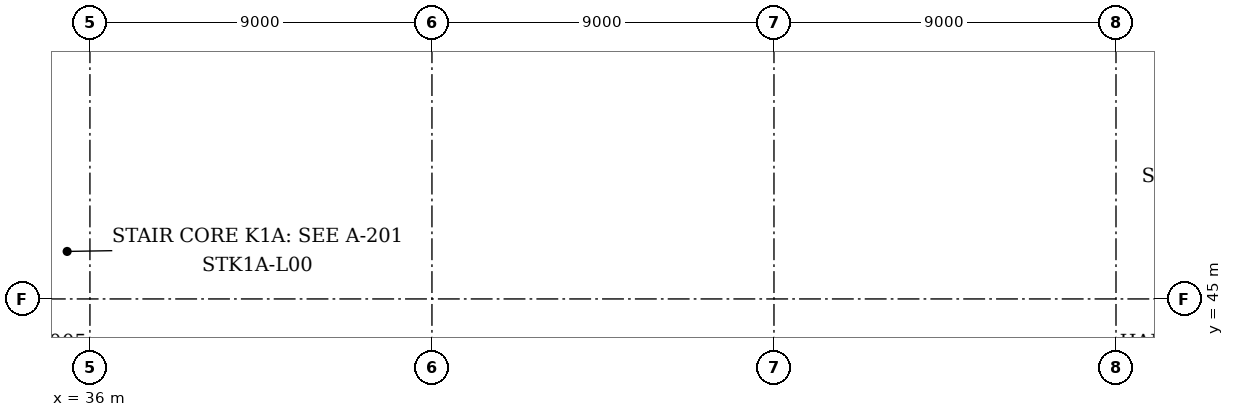
"""IFC4 building model, lengths in metres.
Left out: names, types, materials, properties, quantities, classifications, styles, units other than length and angle.
Written with IfcOpenShell. Run it as: python <this file> out.ifc"""

import sys

from ifc_helpers import new_model, si_unit, direction, frame, frame_2d, origin, origin_2d, place, context, subcontext, project, spatial, rectangle, hollow_rectangle, i_section, extrude, element, fill, save


model = new_model("IFC4")
c1 = context("Model", 3, precision=1e-05, world=origin(), true_north=direction((0.0, 1.0)))
c2 = subcontext(c1, "Body", "Model", "MODEL_VIEW")
j1 = project(units=[si_unit("LENGTHUNIT", "METRE"), si_unit("PLANEANGLEUNIT", "RADIAN")], contexts=[c1])
p1 = place(None, origin())
s1 = spatial("IfcSite", under=j1, at=p1, CompositionType="ELEMENT")
p2 = place(p1, origin())
s2 = spatial("IfcBuilding", under=s1, at=p2, CompositionType="ELEMENT")
p3 = place(p2, origin())
s3 = spatial("IfcBuildingStorey", under=s2, at=p3, CompositionType="ELEMENT", Elevation=0.0)
p4 = place(p3, frame((45.0, 45.0, 0.0), z_axis=(0.0, 0.0, 1.0), x_axis=(1.0, 0.0, 0.0)))
e1 = element("IfcColumn", 1, at=p4, inside=s3, PredefinedType="COLUMN", context=c2, shape_type="SweptSolid", body=[
    extrude(hollow_rectangle(XDim=0.3, YDim=0.3, WallThickness=0.016, InnerFilletRadius=0.024, OuterFilletRadius=0.04, at=origin_2d()), origin(), (0.0, 0.0, 1.0), 5.0),
])
p5 = place(p3, frame((54.0, 45.0, 0.0), z_axis=(0.0, 0.0, 1.0), x_axis=(1.0, 0.0, 0.0)))
e2 = element("IfcColumn", 2, at=p5, inside=s3, PredefinedType="COLUMN", context=c2, shape_type="SweptSolid", body=[
    extrude(i_section(OverallWidth=0.5, OverallDepth=0.48, WebThickness=0.04, FlangeThickness=0.04, at=origin_2d()), origin(), (0.0, 0.0, 1.0), 5.0),
])
p6 = place(p3, frame((54.25, 44.91, 0.0), z_axis=(0.0, 0.0, 1.0), x_axis=(1.0, 0.0, 0.0)))
e3 = element("IfcWall", 3, at=p6, inside=s3, PredefinedType="SOLIDWALL", context=c2, shape_type="SweptSolid", body=[
    extrude(rectangle(XDim=8.75, YDim=0.3, at=frame_2d((4.375, 0.0))), origin(), (0.0, 0.0, 1.0), 4.378),
])
p7 = place(p3, frame((36.0, 44.91, 0.0), z_axis=(0.0, 0.0, 1.0), x_axis=(1.0, 0.0, 0.0)))
e4 = element("IfcWall", 4, at=p7, inside=s3, PredefinedType="SOLIDWALL", context=c2, shape_type="SweptSolid", body=[
    extrude(rectangle(XDim=8.85, YDim=0.3, at=frame_2d((4.425, 0.0))), origin(), (0.0, 0.0, 1.0), 4.378),
])
p8 = place(p3, frame((47.95, 44.85, 0.0), z_axis=(0.0, 0.0, 1.0), x_axis=(1.0, 0.0, 0.0)))
e5 = element("IfcWall", 5, at=p8, inside=s3, PredefinedType="SOLIDWALL", context=c2, shape_type="SweptSolid", body=[
    extrude(rectangle(XDim=3.0, YDim=0.2, at=frame_2d((1.5, 0.0))), origin(), (0.0, 0.0, 1.0), 4.835),
])
p9 = place(p8, frame((0.3, 0.0, 0.0)))
e6 = element("IfcOpeningElement", 6, at=p9, cuts=e5, PredefinedType="OPENING", context=c2, shape_type="SweptSolid", body=[
    extrude(rectangle(XDim=2.4, YDim=2.4, at=frame_2d((1.2, 1.2))), frame((0.0, 0.11, 0.0), z_axis=(0.0, -1.0, 0.0), x_axis=(1.0, 0.0, 0.0)), (0.0, 0.0, 1.0), 0.22),
])
for number, where, z_axis, x_axis in (
    (7, (35.875, 45.2, -0.7), (0.0, 0.0, 1.0), (0.0, 1.0, 0.0)),
    (8, (63.125, 45.2, -0.7), (0.0, 0.0, 1.0), (0.0, 1.0, 0.0)),
):
    element("IfcWall", number, at=place(p3, frame(where, z_axis=z_axis, x_axis=x_axis)), inside=s3, PredefinedType="SOLIDWALL", context=c2, shape_type="SweptSolid", body=[
        extrude(rectangle(XDim=5.55, YDim=0.25, at=frame_2d((2.775, 0.0))), origin(), (0.0, 0.0, 1.0), 0.7),
    ])
for number, where, z_axis, x_axis in (
    (9, (35.75, 50.625, -0.7), (0.0, 0.0, 1.0), (1.0, 0.0, 0.0)),
    (10, (50.7, 50.625, -0.7), (0.0, 0.0, 1.0), (1.0, 0.0, 0.0)),
):
    element("IfcWall", number, at=place(p3, frame(where, z_axis=z_axis, x_axis=x_axis)), inside=s3, PredefinedType="SOLIDWALL", context=c2, shape_type="SweptSolid", body=[
        extrude(rectangle(XDim=12.55, YDim=0.25, at=frame_2d((6.275, 0.0))), origin(), (0.0, 0.0, 1.0), 0.7),
    ])
p10 = place(p3, frame((35.85, 40.8, 0.0), z_axis=(0.0, 0.0, 1.0), x_axis=(0.0, 1.0, 0.0)))
e11 = element("IfcWall", 11, at=p10, inside=s3, PredefinedType="SOLIDWALL", context=c2, shape_type="SweptSolid", body=[
    extrude(rectangle(XDim=3.9, YDim=0.3, at=frame_2d((1.95, 0.0))), origin(), (0.0, 0.0, 1.0), 5.0),
])
p11 = place(p10, frame((1.05, 0.0, 0.0)))
e12 = element("IfcOpeningElement", 12, at=p11, cuts=e11, PredefinedType="OPENING", context=c2, shape_type="SweptSolid", body=[
    extrude(rectangle(XDim=1.8, YDim=2.1, at=frame_2d((0.9, 1.05))), frame((0.0, 0.16, 0.0), z_axis=(0.0, -1.0, 0.0), x_axis=(1.0, 0.0, 0.0)), (0.0, 0.0, 1.0), 0.32),
])
p12 = place(p3, frame((27.0, 44.85, 0.0), z_axis=(0.0, 0.0, 1.0), x_axis=(1.0, 0.0, 0.0)))
e13 = element("IfcWall", 13, at=p12, inside=s3, PredefinedType="SOLIDWALL", context=c2, shape_type="SweptSolid", body=[
    extrude(rectangle(XDim=9.0, YDim=0.3, at=frame_2d((4.5, 0.0))), origin(), (0.0, 0.0, 1.0), 5.0),
])
p13 = place(p12, frame((3.55, 0.0, 0.0)))
e14 = element("IfcOpeningElement", 14, at=p13, cuts=e13, PredefinedType="OPENING", context=c2, shape_type="SweptSolid", body=[
    extrude(rectangle(XDim=1.8, YDim=2.1, at=frame_2d((0.9, 1.05))), frame((0.0, 0.16, 0.0), z_axis=(0.0, -1.0, 0.0), x_axis=(1.0, 0.0, 0.0)), (0.0, 0.0, 1.0), 0.32),
])
p14 = place(p3, frame((63.0, 44.85, 0.0), z_axis=(0.0, 0.0, 1.0), x_axis=(1.0, 0.0, 0.0)))
e15 = element("IfcWall", 15, at=p14, inside=s3, PredefinedType="SOLIDWALL", context=c2, shape_type="SweptSolid", body=[
    extrude(rectangle(XDim=9.0, YDim=0.3, at=frame_2d((4.5, 0.0))), origin(), (0.0, 0.0, 1.0), 5.0),
])
p15 = place(p14, frame((3.65, 0.0, 0.0)))
e16 = element("IfcOpeningElement", 16, at=p15, cuts=e15, PredefinedType="OPENING", context=c2, shape_type="SweptSolid", body=[
    extrude(rectangle(XDim=1.8, YDim=2.1, at=frame_2d((0.9, 1.05))), frame((0.0, 0.16, 0.0), z_axis=(0.0, -1.0, 0.0), x_axis=(1.0, 0.0, 0.0)), (0.0, 0.0, 1.0), 0.32),
])
p16 = place(p3, frame((63.15, 40.8, 0.0), z_axis=(0.0, 0.0, 1.0), x_axis=(0.0, 1.0, 0.0)))
e17 = element("IfcWall", 17, at=p16, inside=s3, PredefinedType="SOLIDWALL", context=c2, shape_type="SweptSolid", body=[
    extrude(rectangle(XDim=3.9, YDim=0.3, at=frame_2d((1.95, 0.0))), origin(), (0.0, 0.0, 1.0), 5.0),
])
p17 = place(p3, frame((54.0, 36.24, 0.0), z_axis=(0.0, 0.0, 1.0), x_axis=(0.0, 1.0, 0.0)))
e18 = element("IfcWall", 18, at=p17, inside=s3, PredefinedType="PARTITIONING", context=c2, shape_type="SweptSolid", body=[
    extrude(rectangle(XDim=8.52, YDim=0.2, at=frame_2d((4.26, 0.0))), origin(), (0.0, 0.0, 1.0), 4.302),
])
p18 = place(p17, frame((3.35, 0.0, 0.0)))
e19 = element("IfcOpeningElement", 19, at=p18, cuts=e18, PredefinedType="OPENING", context=c2, shape_type="SweptSolid", body=[
    extrude(rectangle(XDim=1.8, YDim=2.1, at=frame_2d((0.9, 1.05))), frame((0.0, 0.11, 0.0), z_axis=(0.0, -1.0, 0.0), x_axis=(1.0, 0.0, 0.0)), (0.0, 0.0, 1.0), 0.22),
])
p19 = place(p9, origin())
e20 = element("IfcDoor", 20, at=p19, inside=s3, OperationType="DOUBLE_DOOR_SINGLE_SWING", PredefinedType="DOOR", context=c2, shape_type="SweptSolid", body=[
    extrude(rectangle(XDim=2.4, YDim=2.4, at=frame_2d((1.2, 1.2))), frame((0.0, 0.025, 0.0), z_axis=(0.0, -1.0, 0.0), x_axis=(1.0, 0.0, 0.0)), (0.0, 0.0, 1.0), 0.05),
])
fill(e6, e20)
save(model, sys.argv[1])
